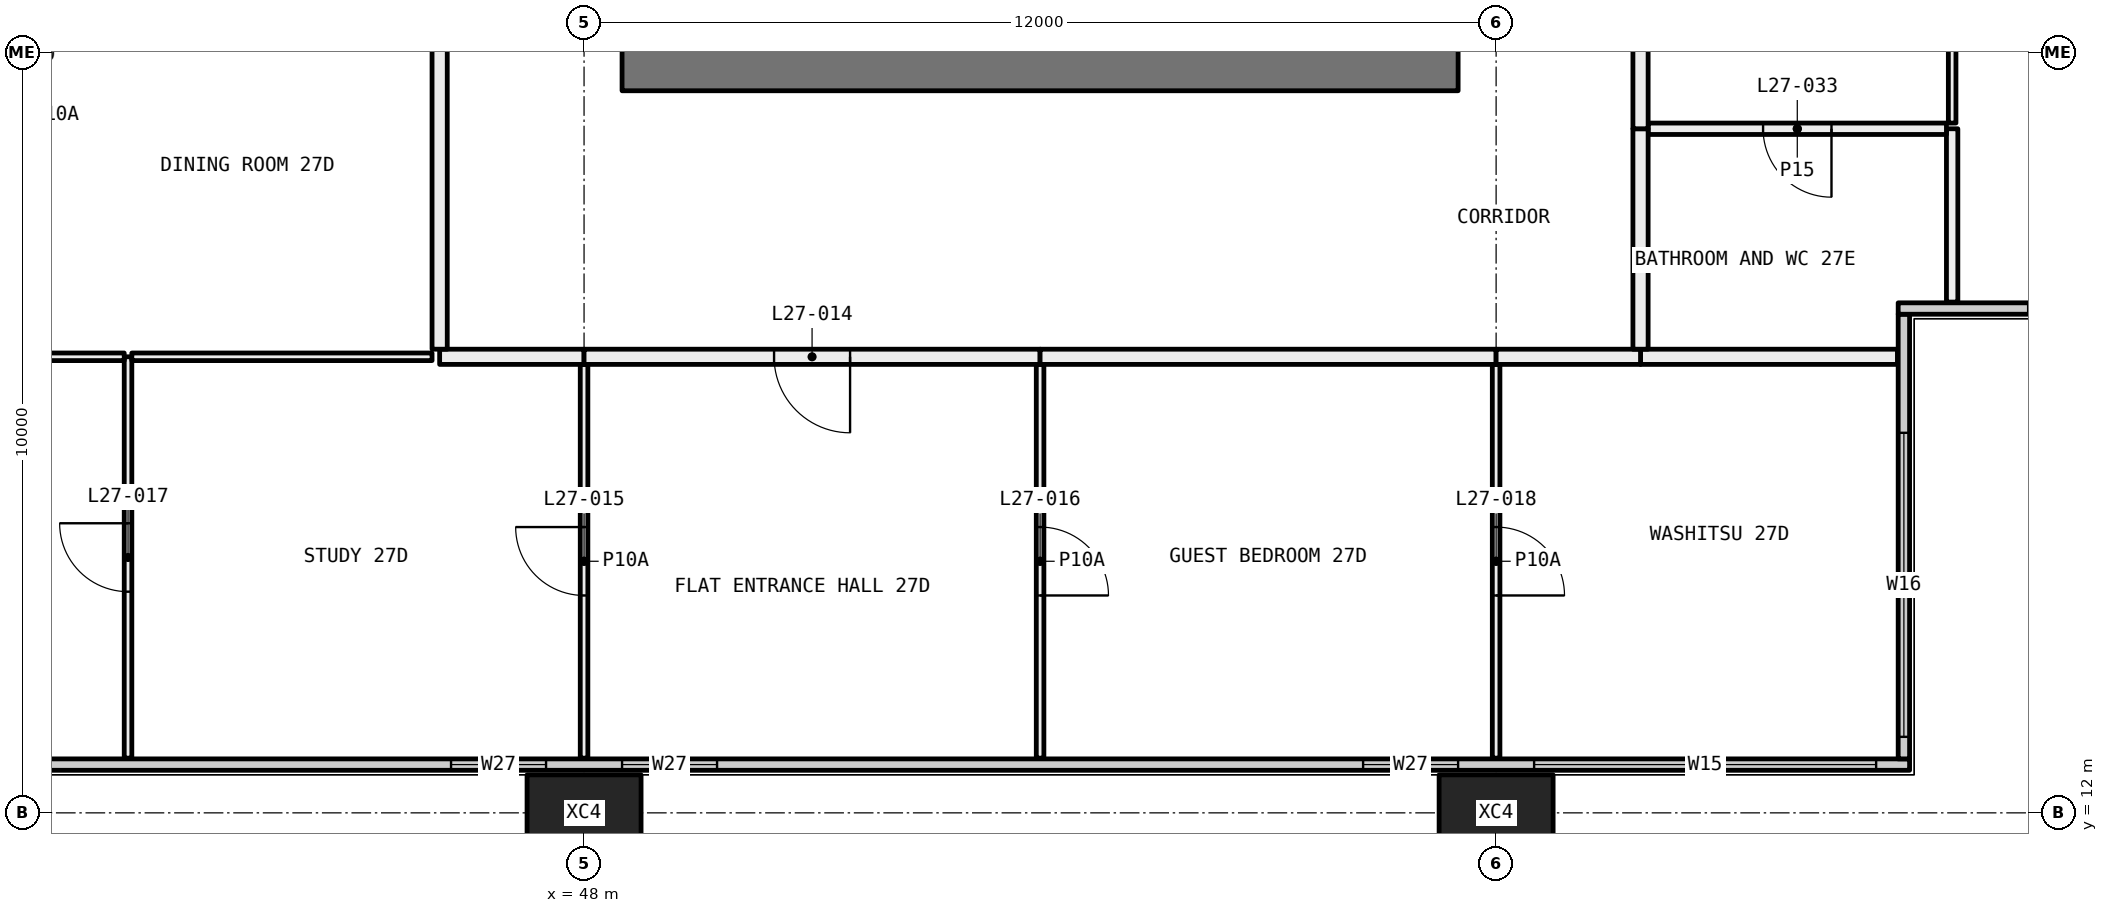
"""IFC4 building model, lengths in metres.
Left out: names, types, materials, properties, quantities, classifications, styles, units other than length and angle.
Written with IfcOpenShell. Run it as: python <this file> out.ifc"""

import sys

from ifc_helpers import new_model, si_unit, direction, frame, frame_2d, origin, origin_2d, place, context, subcontext, project, spatial, rectangle, hollow_rectangle, extrude, element, fill, save


model = new_model("IFC4")
c1 = context("Model", 3, precision=1e-05, world=origin(), true_north=direction((0.0, 1.0)))
c2 = subcontext(c1, "Body", "Model", "MODEL_VIEW")
j1 = project(units=[si_unit("LENGTHUNIT", "METRE"), si_unit("PLANEANGLEUNIT", "RADIAN")], contexts=[c1])
p1 = place(None, origin())
s1 = spatial("IfcSite", under=j1, at=p1, CompositionType="ELEMENT")
p2 = place(p1, origin())
s2 = spatial("IfcBuilding", under=s1, at=p2, CompositionType="ELEMENT")
p3 = place(p2, frame((0.0, 0.0, 106.95)))
s3 = spatial("IfcBuildingStorey", under=s2, at=p3, CompositionType="ELEMENT", Elevation=106.95)
for number, where, z_axis, x_axis in (
    (1, (48.0, 12.0, -0.4), (0.0, 0.0, 1.0), (1.0, 0.0, 0.0)),
    (2, (60.0, 12.0, -0.4), (0.0, 0.0, 1.0), (1.0, 0.0, 0.0)),
):
    element("IfcColumn", number, at=place(p3, frame(where, z_axis=z_axis, x_axis=x_axis)), inside=s3, PredefinedType="COLUMN", context=c2, shape_type="SweptSolid", body=[
        extrude(hollow_rectangle(XDim=1.5, YDim=1.0, WallThickness=0.06, at=origin_2d()), origin(), (0.0, 0.0, 1.0), 3.45),
    ])
p4 = place(p3, frame((6.56, 12.635, 0.0), z_axis=(0.0, 0.0, 1.0), x_axis=(1.0, 0.0, 0.0)))
e3 = element("IfcWall", 3, at=p4, inside=s3, PredefinedType="ELEMENTEDWALL", context=c2, shape_type="SweptSolid", body=[
    extrude(rectangle(XDim=58.88, YDim=0.15, at=frame_2d((29.44, 0.0))), origin(), (0.0, 0.0, 1.0), 3.05),
])
p5 = place(p4, frame((0.44, 0.0, 0.45)))
e4 = element("IfcOpeningElement", 4, at=p5, cuts=e3, PredefinedType="OPENING", context=c2, shape_type="SweptSolid", body=[
    extrude(rectangle(XDim=4.5, YDim=2.55, at=frame_2d((2.25, 1.275))), frame((0.0, 0.085, 0.0), z_axis=(0.0, -1.0, 0.0), x_axis=(1.0, 0.0, 0.0)), (0.0, 0.0, 1.0), 0.17),
])
p6 = place(p4, frame((5.94, 0.0, 0.45)))
e5 = element("IfcOpeningElement", 5, at=p6, cuts=e3, PredefinedType="OPENING", context=c2, shape_type="SweptSolid", body=[
    extrude(rectangle(XDim=1.25, YDim=2.55, at=frame_2d((0.625, 1.275))), frame((0.0, 0.085, 0.0), z_axis=(0.0, -1.0, 0.0), x_axis=(1.0, 0.0, 0.0)), (0.0, 0.0, 1.0), 0.17),
])
p7 = place(p4, frame((15.69, 0.0, 0.45)))
e6 = element("IfcOpeningElement", 6, at=p7, cuts=e3, PredefinedType="OPENING", context=c2, shape_type="SweptSolid", body=[
    extrude(rectangle(XDim=1.25, YDim=2.55, at=frame_2d((0.625, 1.275))), frame((0.0, 0.085, 0.0), z_axis=(0.0, -1.0, 0.0), x_axis=(1.0, 0.0, 0.0)), (0.0, 0.0, 1.0), 0.17),
])
p8 = place(p4, frame((17.94, 0.0, 0.45)))
e7 = element("IfcOpeningElement", 7, at=p8, cuts=e3, PredefinedType="OPENING", context=c2, shape_type="SweptSolid", body=[
    extrude(rectangle(XDim=1.25, YDim=2.55, at=frame_2d((0.625, 1.275))), frame((0.0, 0.085, 0.0), z_axis=(0.0, -1.0, 0.0), x_axis=(1.0, 0.0, 0.0)), (0.0, 0.0, 1.0), 0.17),
])
p9 = place(p4, frame((27.69, 0.0, 0.45)))
e8 = element("IfcOpeningElement", 8, at=p9, cuts=e3, PredefinedType="OPENING", context=c2, shape_type="SweptSolid", body=[
    extrude(rectangle(XDim=1.25, YDim=2.55, at=frame_2d((0.625, 1.275))), frame((0.0, 0.085, 0.0), z_axis=(0.0, -1.0, 0.0), x_axis=(1.0, 0.0, 0.0)), (0.0, 0.0, 1.0), 0.17),
])
p10 = place(p4, frame((29.94, 0.0, 0.45)))
e9 = element("IfcOpeningElement", 9, at=p10, cuts=e3, PredefinedType="OPENING", context=c2, shape_type="SweptSolid", body=[
    extrude(rectangle(XDim=1.25, YDim=2.55, at=frame_2d((0.625, 1.275))), frame((0.0, 0.085, 0.0), z_axis=(0.0, -1.0, 0.0), x_axis=(1.0, 0.0, 0.0)), (0.0, 0.0, 1.0), 0.17),
])
p11 = place(p4, frame((39.69, 0.0, 0.45)))
e10 = element("IfcOpeningElement", 10, at=p11, cuts=e3, PredefinedType="OPENING", context=c2, shape_type="SweptSolid", body=[
    extrude(rectangle(XDim=1.25, YDim=2.55, at=frame_2d((0.625, 1.275))), frame((0.0, 0.085, 0.0), z_axis=(0.0, -1.0, 0.0), x_axis=(1.0, 0.0, 0.0)), (0.0, 0.0, 1.0), 0.17),
])
p12 = place(p4, frame((41.94, 0.0, 0.45)))
e11 = element("IfcOpeningElement", 11, at=p12, cuts=e3, PredefinedType="OPENING", context=c2, shape_type="SweptSolid", body=[
    extrude(rectangle(XDim=1.25, YDim=2.55, at=frame_2d((0.625, 1.275))), frame((0.0, 0.085, 0.0), z_axis=(0.0, -1.0, 0.0), x_axis=(1.0, 0.0, 0.0)), (0.0, 0.0, 1.0), 0.17),
])
p13 = place(p4, frame((51.69, 0.0, 0.45)))
e12 = element("IfcOpeningElement", 12, at=p13, cuts=e3, PredefinedType="OPENING", context=c2, shape_type="SweptSolid", body=[
    extrude(rectangle(XDim=1.25, YDim=2.55, at=frame_2d((0.625, 1.275))), frame((0.0, 0.085, 0.0), z_axis=(0.0, -1.0, 0.0), x_axis=(1.0, 0.0, 0.0)), (0.0, 0.0, 1.0), 0.17),
])
p14 = place(p4, frame((53.94, 0.0, 0.45)))
e13 = element("IfcOpeningElement", 13, at=p14, cuts=e3, PredefinedType="OPENING", context=c2, shape_type="SweptSolid", body=[
    extrude(rectangle(XDim=4.5, YDim=2.55, at=frame_2d((2.25, 1.275))), frame((0.0, 0.085, 0.0), z_axis=(0.0, -1.0, 0.0), x_axis=(1.0, 0.0, 0.0)), (0.0, 0.0, 1.0), 0.17),
])
p15 = place(p3, frame((65.365, 12.71, 0.0), z_axis=(0.0, 0.0, 1.0), x_axis=(0.0, 1.0, 0.0)))
e14 = element("IfcWall", 14, at=p15, inside=s3, PredefinedType="ELEMENTEDWALL", context=c2, shape_type="SweptSolid", body=[
    extrude(rectangle(XDim=5.85, YDim=0.15, at=frame_2d((2.925, 0.0))), origin(), (0.0, 0.0, 1.0), 3.05),
])
p16 = place(p15, frame((0.29, 0.0, 0.45)))
e15 = element("IfcOpeningElement", 15, at=p16, cuts=e14, PredefinedType="OPENING", context=c2, shape_type="SweptSolid", body=[
    extrude(rectangle(XDim=4.0, YDim=2.55, at=frame_2d((2.0, 1.275))), frame((0.0, 0.085, 0.0), z_axis=(0.0, -1.0, 0.0), x_axis=(1.0, 0.0, 0.0)), (0.0, 0.0, 1.0), 0.17),
])
p17 = place(p3, frame((65.29, 18.635, 0.0), z_axis=(0.0, 0.0, 1.0), x_axis=(1.0, 0.0, 0.0)))
e16 = element("IfcWall", 16, at=p17, inside=s3, PredefinedType="ELEMENTEDWALL", context=c2, shape_type="SweptSolid", body=[
    extrude(rectangle(XDim=6.15, YDim=0.15, at=frame_2d((3.075, 0.0))), origin(), (0.0, 0.0, 1.0), 3.05),
])
p18 = place(p17, frame((1.71, 0.0, 0.45)))
e17 = element("IfcOpeningElement", 17, at=p18, cuts=e16, PredefinedType="OPENING", context=c2, shape_type="SweptSolid", body=[
    extrude(rectangle(XDim=4.0, YDim=2.55, at=frame_2d((2.0, 1.275))), frame((0.0, 0.085, 0.0), z_axis=(0.0, -1.0, 0.0), x_axis=(1.0, 0.0, 0.0)), (0.0, 0.0, 1.0), 0.17),
])
p19 = place(p3, frame((42.0, 12.72, 0.0), z_axis=(0.0, 0.0, 1.0), x_axis=(0.0, 1.0, 0.0)))
e18 = element("IfcWall", 18, at=p19, inside=s3, PredefinedType="PARTITIONING", context=c2, shape_type="SweptSolid", body=[
    extrude(rectangle(XDim=5.28, YDim=0.1, at=frame_2d((2.64, 0.0))), origin(), (0.0, 0.0, 1.0), 3.05),
])
p20 = place(p19, frame((2.19, 0.0, 0.0)))
e19 = element("IfcOpeningElement", 19, at=p20, cuts=e18, PredefinedType="OPENING", context=c2, shape_type="SweptSolid", body=[
    extrude(rectangle(XDim=0.9, YDim=2.1, at=frame_2d((0.45, 1.05))), frame((0.0, 0.06, 0.0), z_axis=(0.0, -1.0, 0.0), x_axis=(1.0, 0.0, 0.0)), (0.0, 0.0, 1.0), 0.12),
])
p21 = place(p3, frame((41.95, 18.0, 0.0), z_axis=(0.0, 0.0, 1.0), x_axis=(-1.0, 0.0, 0.0)))
e20 = element("IfcWall", 20, at=p21, inside=s3, PredefinedType="PARTITIONING", context=c2, shape_type="SweptSolid", body=[
    extrude(rectangle(XDim=1.45, YDim=0.1, at=frame_2d((0.725, 0.0))), origin(), (0.0, 0.0, 1.0), 3.05),
])
p22 = place(p3, frame((48.0, 12.72, 0.0), z_axis=(0.0, 0.0, 1.0), x_axis=(0.0, 1.0, 0.0)))
e21 = element("IfcWall", 21, at=p22, inside=s3, PredefinedType="PARTITIONING", context=c2, shape_type="SweptSolid", body=[
    extrude(rectangle(XDim=5.18, YDim=0.1, at=frame_2d((2.59, 0.0))), origin(), (0.0, 0.0, 1.0), 3.05),
])
p23 = place(p22, frame((2.14, 0.0, 0.0)))
e22 = element("IfcOpeningElement", 22, at=p23, cuts=e21, PredefinedType="OPENING", context=c2, shape_type="SweptSolid", body=[
    extrude(rectangle(XDim=0.9, YDim=2.1, at=frame_2d((0.45, 1.05))), frame((0.0, 0.06, 0.0), z_axis=(0.0, -1.0, 0.0), x_axis=(1.0, 0.0, 0.0)), (0.0, 0.0, 1.0), 0.12),
])
p24 = place(p3, frame((46.0, 18.0, 0.0), z_axis=(0.0, 0.0, 1.0), x_axis=(-1.0, 0.0, 0.0)))
e23 = element("IfcWall", 23, at=p24, inside=s3, PredefinedType="PARTITIONING", context=c2, shape_type="SweptSolid", body=[
    extrude(rectangle(XDim=3.95, YDim=0.1, at=frame_2d((1.975, 0.0))), origin(), (0.0, 0.0, 1.0), 3.05),
])
p25 = place(p3, frame((48.0, 18.0, 0.0), z_axis=(0.0, 0.0, 1.0), x_axis=(-1.0, 0.0, 0.0)))
e24 = element("IfcWall", 24, at=p25, inside=s3, PredefinedType="PARTITIONING", context=c2, shape_type="SweptSolid", body=[
    extrude(rectangle(XDim=1.9, YDim=0.2, at=frame_2d((0.95, 0.0))), origin(), (0.0, 0.0, 1.0), 3.05),
])
p26 = place(p3, frame((54.0, 12.72, 0.0), z_axis=(0.0, 0.0, 1.0), x_axis=(0.0, 1.0, 0.0)))
e25 = element("IfcWall", 25, at=p26, inside=s3, PredefinedType="PARTITIONING", context=c2, shape_type="SweptSolid", body=[
    extrude(rectangle(XDim=5.18, YDim=0.1, at=frame_2d((2.59, 0.0))), origin(), (0.0, 0.0, 1.0), 3.05),
])
p27 = place(p26, frame((2.14, 0.0, 0.0)))
e26 = element("IfcOpeningElement", 26, at=p27, cuts=e25, PredefinedType="OPENING", context=c2, shape_type="SweptSolid", body=[
    extrude(rectangle(XDim=0.9, YDim=2.1, at=frame_2d((0.45, 1.05))), frame((0.0, 0.06, 0.0), z_axis=(0.0, -1.0, 0.0), x_axis=(1.0, 0.0, 0.0)), (0.0, 0.0, 1.0), 0.12),
])
p28 = place(p3, frame((54.0, 18.0, 0.0), z_axis=(0.0, 0.0, 1.0), x_axis=(-1.0, 0.0, 0.0)))
e27 = element("IfcWall", 27, at=p28, inside=s3, PredefinedType="PARTITIONING", context=c2, shape_type="SweptSolid", body=[
    extrude(rectangle(XDim=6.0, YDim=0.2, at=frame_2d((3.0, 0.0))), origin(), (0.0, 0.0, 1.0), 3.05),
])
p29 = place(p28, frame((2.5, 0.0, 0.0)))
e28 = element("IfcOpeningElement", 28, at=p29, cuts=e27, PredefinedType="OPENING", context=c2, shape_type="SweptSolid", body=[
    extrude(rectangle(XDim=1.0, YDim=2.1, at=frame_2d((0.5, 1.05))), frame((0.0, 0.11, 0.0), z_axis=(0.0, -1.0, 0.0), x_axis=(1.0, 0.0, 0.0)), (0.0, 0.0, 1.0), 0.22),
])
p30 = place(p3, frame((60.0, 12.72, 0.0), z_axis=(0.0, 0.0, 1.0), x_axis=(0.0, 1.0, 0.0)))
e29 = element("IfcWall", 29, at=p30, inside=s3, PredefinedType="PARTITIONING", context=c2, shape_type="SweptSolid", body=[
    extrude(rectangle(XDim=5.18, YDim=0.1, at=frame_2d((2.59, 0.0))), origin(), (0.0, 0.0, 1.0), 3.05),
])
p31 = place(p30, frame((2.14, 0.0, 0.0)))
e30 = element("IfcOpeningElement", 30, at=p31, cuts=e29, PredefinedType="OPENING", context=c2, shape_type="SweptSolid", body=[
    extrude(rectangle(XDim=0.9, YDim=2.1, at=frame_2d((0.45, 1.05))), frame((0.0, 0.06, 0.0), z_axis=(0.0, -1.0, 0.0), x_axis=(1.0, 0.0, 0.0)), (0.0, 0.0, 1.0), 0.12),
])
p32 = place(p3, frame((60.0, 18.0, 0.0), z_axis=(0.0, 0.0, 1.0), x_axis=(-1.0, 0.0, 0.0)))
e31 = element("IfcWall", 31, at=p32, inside=s3, PredefinedType="PARTITIONING", context=c2, shape_type="SweptSolid", body=[
    extrude(rectangle(XDim=6.0, YDim=0.2, at=frame_2d((3.0, 0.0))), origin(), (0.0, 0.0, 1.0), 3.05),
])
p33 = place(p3, frame((65.28, 18.0, 0.0), z_axis=(0.0, 0.0, 1.0), x_axis=(-1.0, 0.0, 0.0)))
e32 = element("IfcWall", 32, at=p33, inside=s3, PredefinedType="PARTITIONING", context=c2, shape_type="SweptSolid", body=[
    extrude(rectangle(XDim=3.38, YDim=0.2, at=frame_2d((1.69, 0.0))), origin(), (0.0, 0.0, 1.0), 3.05),
])
p34 = place(p3, frame((61.9, 18.0, 0.0), z_axis=(0.0, 0.0, 1.0), x_axis=(-1.0, 0.0, 0.0)))
e33 = element("IfcWall", 33, at=p34, inside=s3, PredefinedType="PARTITIONING", context=c2, shape_type="SweptSolid", body=[
    extrude(rectangle(XDim=1.9, YDim=0.2, at=frame_2d((0.95, 0.0))), origin(), (0.0, 0.0, 1.0), 3.05),
])
p35 = place(p3, frame((46.1, 18.1, 0.0), z_axis=(0.0, 0.0, 1.0), x_axis=(0.0, 1.0, 0.0)))
e34 = element("IfcWall", 34, at=p35, inside=s3, PredefinedType="PARTITIONING", context=c2, shape_type="SweptSolid", body=[
    extrude(rectangle(XDim=6.2, YDim=0.2, at=frame_2d((3.1, 0.0))), origin(), (0.0, 0.0, 1.0), 2.45),
])
p36 = place(p3, frame((66.0, 21.0, 0.0), z_axis=(0.0, 0.0, 1.0), x_axis=(0.0, -1.0, 0.0)))
e35 = element("IfcWall", 35, at=p36, inside=s3, PredefinedType="PARTITIONING", context=c2, shape_type="SweptSolid", body=[
    extrude(rectangle(XDim=2.28, YDim=0.15, at=frame_2d((1.14, 0.0))), origin(), (0.0, 0.0, 1.0), 3.05),
])
p37 = place(p3, frame((66.0, 23.95, 0.0), z_axis=(0.0, 0.0, 1.0), x_axis=(0.0, -1.0, 0.0)))
e36 = element("IfcWall", 36, at=p37, inside=s3, PredefinedType="PARTITIONING", context=c2, shape_type="SweptSolid", body=[
    extrude(rectangle(XDim=2.875, YDim=0.1, at=frame_2d((1.438, 0.0))), origin(), (0.0, 0.0, 1.0), 2.45),
])
p38 = place(p3, frame((65.925, 21.0, 0.0), z_axis=(0.0, 0.0, 1.0), x_axis=(-1.0, 0.0, 0.0)))
e37 = element("IfcWall", 37, at=p38, inside=s3, PredefinedType="PARTITIONING", context=c2, shape_type="SweptSolid", body=[
    extrude(rectangle(XDim=3.925, YDim=0.15, at=frame_2d((1.962, 0.0))), origin(), (0.0, 0.0, 1.0), 3.05),
])
p39 = place(p38, frame((1.512, 0.0, 0.0)))
e38 = element("IfcOpeningElement", 38, at=p39, cuts=e37, PredefinedType="OPENING", context=c2, shape_type="SweptSolid", body=[
    extrude(rectangle(XDim=0.9, YDim=2.1, at=frame_2d((0.45, 1.05))), frame((0.0, 0.085, 0.0), z_axis=(0.0, -1.0, 0.0), x_axis=(1.0, 0.0, 0.0)), (0.0, 0.0, 1.0), 0.17),
])
for number, where, z_axis, x_axis in (
    (39, (61.9, 21.0, 0.0), (0.0, 0.0, 1.0), (0.0, -1.0, 0.0)),
    (40, (61.9, 23.9, 0.0), (0.0, 0.0, 1.0), (0.0, -1.0, 0.0)),
):
    element("IfcWall", number, at=place(p3, frame(where, z_axis=z_axis, x_axis=x_axis)), inside=s3, PredefinedType="PARTITIONING", context=c2, shape_type="SweptSolid", body=[
        extrude(rectangle(XDim=2.9, YDim=0.2, at=frame_2d((1.45, 0.0))), origin(), (0.0, 0.0, 1.0), 3.05),
    ])
p40 = place(p3, frame((59.5, 21.825, 0.0), z_axis=(0.0, 0.0, 1.0), x_axis=(-1.0, 0.0, 0.0)))
e41 = element("IfcWall", 41, at=p40, inside=s3, PredefinedType="SHEAR", context=c2, shape_type="SweptSolid", body=[
    extrude(rectangle(XDim=11.0, YDim=0.65, at=frame_2d((5.5, 0.0))), origin(), (0.0, 0.0, 1.0), 3.05),
])
p41 = place(p11, origin())
e42 = element("IfcWindow", 42, at=p41, inside=s3, PartitioningType="SINGLE_PANEL", PredefinedType="WINDOW", context=c2, shape_type="SweptSolid", body=[
    extrude(rectangle(XDim=1.25, YDim=2.55, at=frame_2d((0.625, 1.275))), frame((0.0, 0.03, 0.0), z_axis=(0.0, -1.0, 0.0), x_axis=(1.0, 0.0, 0.0)), (0.0, 0.0, 1.0), 0.06),
])
fill(e10, e42)
p42 = place(p12, origin())
e43 = element("IfcWindow", 43, at=p42, inside=s3, PartitioningType="SINGLE_PANEL", PredefinedType="WINDOW", context=c2, shape_type="SweptSolid", body=[
    extrude(rectangle(XDim=1.25, YDim=2.55, at=frame_2d((0.625, 1.275))), frame((0.0, 0.03, 0.0), z_axis=(0.0, -1.0, 0.0), x_axis=(1.0, 0.0, 0.0)), (0.0, 0.0, 1.0), 0.06),
])
fill(e11, e43)
p43 = place(p13, origin())
e44 = element("IfcWindow", 44, at=p43, inside=s3, PartitioningType="SINGLE_PANEL", PredefinedType="WINDOW", context=c2, shape_type="SweptSolid", body=[
    extrude(rectangle(XDim=1.25, YDim=2.55, at=frame_2d((0.625, 1.275))), frame((0.0, 0.03, 0.0), z_axis=(0.0, -1.0, 0.0), x_axis=(1.0, 0.0, 0.0)), (0.0, 0.0, 1.0), 0.06),
])
fill(e12, e44)
p44 = place(p14, origin())
e45 = element("IfcWindow", 45, at=p44, inside=s3, PartitioningType="SINGLE_PANEL", PredefinedType="WINDOW", context=c2, shape_type="SweptSolid", body=[
    extrude(rectangle(XDim=4.5, YDim=2.55, at=frame_2d((2.25, 1.275))), frame((0.0, 0.03, 0.0), z_axis=(0.0, -1.0, 0.0), x_axis=(1.0, 0.0, 0.0)), (0.0, 0.0, 1.0), 0.06),
])
fill(e13, e45)
p45 = place(p16, origin())
e46 = element("IfcWindow", 46, at=p45, inside=s3, PartitioningType="SINGLE_PANEL", PredefinedType="WINDOW", context=c2, shape_type="SweptSolid", body=[
    extrude(rectangle(XDim=4.0, YDim=2.55, at=frame_2d((2.0, 1.275))), frame((0.0, 0.03, 0.0), z_axis=(0.0, -1.0, 0.0), x_axis=(1.0, 0.0, 0.0)), (0.0, 0.0, 1.0), 0.06),
])
fill(e15, e46)
p46 = place(p29, origin())
e47 = element("IfcDoor", 47, at=p46, inside=s3, OperationType="SINGLE_SWING_RIGHT", PredefinedType="DOOR", context=c2, shape_type="SweptSolid", body=[
    extrude(rectangle(XDim=1.0, YDim=2.1, at=frame_2d((0.5, 1.05))), frame((0.0, 0.025, 0.0), z_axis=(0.0, -1.0, 0.0), x_axis=(1.0, 0.0, 0.0)), (0.0, 0.0, 1.0), 0.05),
])
fill(e28, e47)
p47 = place(p23, origin())
e48 = element("IfcDoor", 48, at=p47, inside=s3, OperationType="SINGLE_SWING_LEFT", PredefinedType="DOOR", context=c2, shape_type="SweptSolid", body=[
    extrude(rectangle(XDim=0.9, YDim=2.1, at=frame_2d((0.45, 1.05))), frame((0.0, 0.025, 0.0), z_axis=(0.0, -1.0, 0.0), x_axis=(1.0, 0.0, 0.0)), (0.0, 0.0, 1.0), 0.05),
])
fill(e22, e48)
p48 = place(p27, frame((0.9, 0.0, 0.0), x_axis=(-1.0, 0.0, 0.0)))
e49 = element("IfcDoor", 49, at=p48, inside=s3, OperationType="SINGLE_SWING_LEFT", PredefinedType="DOOR", context=c2, shape_type="SweptSolid", body=[
    extrude(rectangle(XDim=0.9, YDim=2.1, at=frame_2d((0.45, 1.05))), frame((0.0, 0.025, 0.0), z_axis=(0.0, -1.0, 0.0), x_axis=(1.0, 0.0, 0.0)), (0.0, 0.0, 1.0), 0.05),
])
fill(e26, e49)
p49 = place(p20, origin())
e50 = element("IfcDoor", 50, at=p49, inside=s3, OperationType="SINGLE_SWING_LEFT", PredefinedType="DOOR", context=c2, shape_type="SweptSolid", body=[
    extrude(rectangle(XDim=0.9, YDim=2.1, at=frame_2d((0.45, 1.05))), frame((0.0, 0.025, 0.0), z_axis=(0.0, -1.0, 0.0), x_axis=(1.0, 0.0, 0.0)), (0.0, 0.0, 1.0), 0.05),
])
fill(e19, e50)
p50 = place(p31, frame((0.9, 0.0, 0.0), x_axis=(-1.0, 0.0, 0.0)))
e51 = element("IfcDoor", 51, at=p50, inside=s3, OperationType="SINGLE_SWING_LEFT", PredefinedType="DOOR", context=c2, shape_type="SweptSolid", body=[
    extrude(rectangle(XDim=0.9, YDim=2.1, at=frame_2d((0.45, 1.05))), frame((0.0, 0.025, 0.0), z_axis=(0.0, -1.0, 0.0), x_axis=(1.0, 0.0, 0.0)), (0.0, 0.0, 1.0), 0.05),
])
fill(e30, e51)
p51 = place(p39, origin())
e52 = element("IfcDoor", 52, at=p51, inside=s3, OperationType="SINGLE_SWING_RIGHT", PredefinedType="DOOR", context=c2, shape_type="SweptSolid", body=[
    extrude(rectangle(XDim=0.9, YDim=2.1, at=frame_2d((0.45, 1.05))), frame((0.0, 0.025, 0.0), z_axis=(0.0, -1.0, 0.0), x_axis=(1.0, 0.0, 0.0)), (0.0, 0.0, 1.0), 0.05),
])
fill(e38, e52)
save(model, sys.argv[1])
